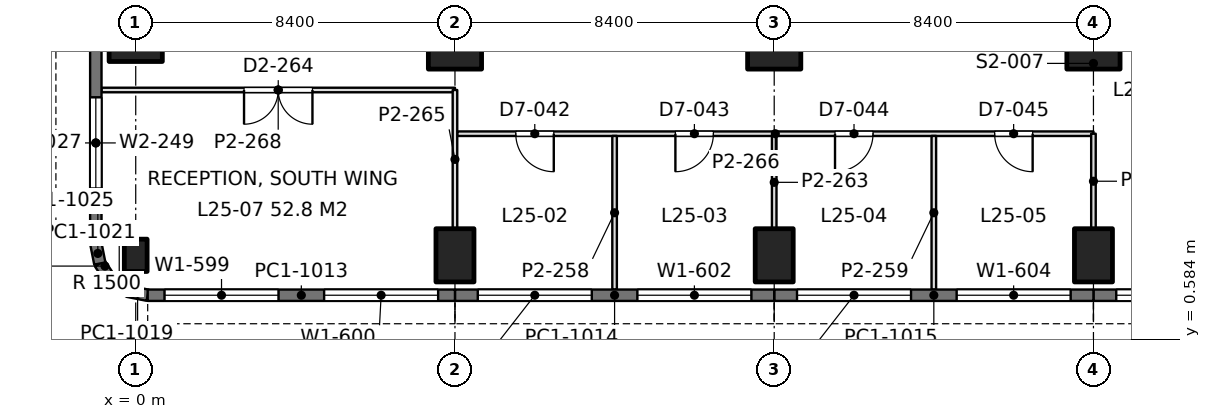
"""IFC4 building model, lengths in metres.
Left out: names, types, materials, properties, quantities, classifications, styles, units other than length and angle.
Written with IfcOpenShell. Run it as: python <this file> out.ifc"""

import sys

from ifc_helpers import new_model, si_unit, direction, frame, frame_2d, origin, origin_2d, place, context, subcontext, project, spatial, rectangle, extrude, element, fill, save


model = new_model("IFC4")
c1 = context("Model", 3, precision=1e-05, world=origin(), true_north=direction((0.0, 1.0)))
c2 = subcontext(c1, "Body", "Model", "MODEL_VIEW")
j1 = project(units=[si_unit("LENGTHUNIT", "METRE"), si_unit("PLANEANGLEUNIT", "RADIAN")], contexts=[c1])
p1 = place(None, origin())
s1 = spatial("IfcSite", under=j1, at=p1, CompositionType="ELEMENT")
p2 = place(p1, origin())
s2 = spatial("IfcBuilding", under=s1, at=p2, CompositionType="ELEMENT")
p3 = place(p2, frame((0.0, 0.0, 113.4)))
s3 = spatial("IfcBuildingStorey", under=s2, at=p3, CompositionType="ELEMENT", Elevation=113.4)
p4 = place(p3, frame((0.0, 2.8, 0.0), z_axis=(0.0, 0.0, 1.0), x_axis=(1.0, 0.0, 0.0)))
e1 = element("IfcColumn", 1, at=p4, inside=s3, PredefinedType="COLUMN", context=c2, shape_type="SweptSolid", body=[
    extrude(rectangle(XDim=0.6, YDim=0.85, at=origin_2d()), origin(), (0.0, 0.0, 1.0), 4.2),
])
for number, where, z_axis, x_axis in (
    (2, (0.0, 8.4, 0.0), (0.0, 0.0, 1.0), (0.0, 1.0, 0.0)),
    (3, (8.4, 2.8, 0.0), (0.0, 0.0, 1.0), (1.0, 0.0, 0.0)),
):
    element("IfcColumn", number, at=place(p3, frame(where, z_axis=z_axis, x_axis=x_axis)), inside=s3, PredefinedType="COLUMN", context=c2, shape_type="SweptSolid", body=[
        extrude(rectangle(XDim=1.0, YDim=1.4, at=origin_2d()), origin(), (0.0, 0.0, 1.0), 4.2),
    ])
p5 = place(p3, frame((8.4, 8.4, 0.0), z_axis=(0.0, 0.0, 1.0), x_axis=(1.0, 0.0, 0.0)))
e4 = element("IfcColumn", 4, at=p5, inside=s3, PredefinedType="COLUMN", context=c2, shape_type="SweptSolid", body=[
    extrude(rectangle(XDim=1.4, YDim=1.4, at=origin_2d()), origin(), (0.0, 0.0, 1.0), 4.2),
])
p6 = place(p3, frame((16.8, 2.8, 0.0), z_axis=(0.0, 0.0, 1.0), x_axis=(1.0, 0.0, 0.0)))
e5 = element("IfcColumn", 5, at=p6, inside=s3, PredefinedType="COLUMN", context=c2, shape_type="SweptSolid", body=[
    extrude(rectangle(XDim=1.0, YDim=1.4, at=origin_2d()), origin(), (0.0, 0.0, 1.0), 4.2),
])
p7 = place(p3, frame((16.8, 8.4, 0.0), z_axis=(0.0, 0.0, 1.0), x_axis=(1.0, 0.0, 0.0)))
e6 = element("IfcColumn", 6, at=p7, inside=s3, PredefinedType="COLUMN", context=c2, shape_type="SweptSolid", body=[
    extrude(rectangle(XDim=1.4, YDim=1.4, at=origin_2d()), origin(), (0.0, 0.0, 1.0), 4.2),
])
p8 = place(p3, frame((25.2, 2.8, 0.0), z_axis=(0.0, 0.0, 1.0), x_axis=(1.0, 0.0, 0.0)))
e7 = element("IfcColumn", 7, at=p8, inside=s3, PredefinedType="COLUMN", context=c2, shape_type="SweptSolid", body=[
    extrude(rectangle(XDim=1.0, YDim=1.4, at=origin_2d()), origin(), (0.0, 0.0, 1.0), 4.2),
])
p9 = place(p3, frame((25.2, 8.4, 0.0), z_axis=(0.0, 0.0, 1.0), x_axis=(1.0, 0.0, 0.0)))
e8 = element("IfcColumn", 8, at=p9, inside=s3, PredefinedType="COLUMN", context=c2, shape_type="SweptSolid", body=[
    extrude(rectangle(XDim=1.4, YDim=1.4, at=origin_2d()), origin(), (0.0, 0.0, 1.0), 4.2),
])
p10 = place(p3, frame((33.6, 1.75, 0.0), z_axis=(0.0, 0.0, 1.0), x_axis=(-1.0, 0.0, 0.0)))
e9 = element("IfcWall", 9, at=p10, inside=s3, PredefinedType="SOLIDWALL", context=c2, shape_type="SweptSolid", body=[
    extrude(rectangle(XDim=8.4, YDim=0.3, at=frame_2d((4.2, 0.0))), origin(), (0.0, 0.0, 1.0), 4.05),
])
p11 = place(p10, frame((0.6, 0.0, 0.9)))
e10 = element("IfcOpeningElement", 10, at=p11, cuts=e9, PredefinedType="OPENING", context=c2, shape_type="SweptSolid", body=[
    extrude(rectangle(XDim=3.0, YDim=1.9, at=frame_2d((1.5, 0.95))), frame((0.0, 0.16, 0.0), z_axis=(0.0, -1.0, 0.0), x_axis=(1.0, 0.0, 0.0)), (0.0, 0.0, 1.0), 0.32),
])
p12 = place(p10, frame((4.8, 0.0, 0.9)))
e11 = element("IfcOpeningElement", 11, at=p12, cuts=e9, PredefinedType="OPENING", context=c2, shape_type="SweptSolid", body=[
    extrude(rectangle(XDim=3.0, YDim=1.9, at=frame_2d((1.5, 0.95))), frame((0.0, 0.16, 0.0), z_axis=(0.0, -1.0, 0.0), x_axis=(1.0, 0.0, 0.0)), (0.0, 0.0, 1.0), 0.32),
])
p13 = place(p3, frame((25.2, 1.75, 0.0), z_axis=(0.0, 0.0, 1.0), x_axis=(-1.0, 0.0, 0.0)))
e12 = element("IfcWall", 12, at=p13, inside=s3, PredefinedType="SOLIDWALL", context=c2, shape_type="SweptSolid", body=[
    extrude(rectangle(XDim=8.4, YDim=0.3, at=frame_2d((4.2, 0.0))), origin(), (0.0, 0.0, 1.0), 4.05),
])
p14 = place(p13, frame((0.6, 0.0, 0.9)))
e13 = element("IfcOpeningElement", 13, at=p14, cuts=e12, PredefinedType="OPENING", context=c2, shape_type="SweptSolid", body=[
    extrude(rectangle(XDim=3.0, YDim=1.9, at=frame_2d((1.5, 0.95))), frame((0.0, 0.16, 0.0), z_axis=(0.0, -1.0, 0.0), x_axis=(1.0, 0.0, 0.0)), (0.0, 0.0, 1.0), 0.32),
])
p15 = place(p13, frame((4.8, 0.0, 0.9)))
e14 = element("IfcOpeningElement", 14, at=p15, cuts=e12, PredefinedType="OPENING", context=c2, shape_type="SweptSolid", body=[
    extrude(rectangle(XDim=3.0, YDim=1.9, at=frame_2d((1.5, 0.95))), frame((0.0, 0.16, 0.0), z_axis=(0.0, -1.0, 0.0), x_axis=(1.0, 0.0, 0.0)), (0.0, 0.0, 1.0), 0.32),
])
p16 = place(p3, frame((16.8, 1.75, 0.0), z_axis=(0.0, 0.0, 1.0), x_axis=(-1.0, 0.0, 0.0)))
e15 = element("IfcWall", 15, at=p16, inside=s3, PredefinedType="SOLIDWALL", context=c2, shape_type="SweptSolid", body=[
    extrude(rectangle(XDim=8.4, YDim=0.3, at=frame_2d((4.2, 0.0))), origin(), (0.0, 0.0, 1.0), 4.05),
])
p17 = place(p16, frame((0.6, 0.0, 0.9)))
e16 = element("IfcOpeningElement", 16, at=p17, cuts=e15, PredefinedType="OPENING", context=c2, shape_type="SweptSolid", body=[
    extrude(rectangle(XDim=3.0, YDim=1.9, at=frame_2d((1.5, 0.95))), frame((0.0, 0.16, 0.0), z_axis=(0.0, -1.0, 0.0), x_axis=(1.0, 0.0, 0.0)), (0.0, 0.0, 1.0), 0.32),
])
p18 = place(p16, frame((4.8, 0.0, 0.9)))
e17 = element("IfcOpeningElement", 17, at=p18, cuts=e15, PredefinedType="OPENING", context=c2, shape_type="SweptSolid", body=[
    extrude(rectangle(XDim=3.0, YDim=1.9, at=frame_2d((1.5, 0.95))), frame((0.0, 0.16, 0.0), z_axis=(0.0, -1.0, 0.0), x_axis=(1.0, 0.0, 0.0)), (0.0, 0.0, 1.0), 0.32),
])
p19 = place(p3, frame((8.4, 1.75, 0.0), z_axis=(0.0, 0.0, 1.0), x_axis=(-1.0, 0.0, 0.0)))
e18 = element("IfcWall", 18, at=p19, inside=s3, PredefinedType="SOLIDWALL", context=c2, shape_type="SweptSolid", body=[
    extrude(rectangle(XDim=8.085, YDim=0.3, at=frame_2d((4.042, 0.0))), origin(), (0.0, 0.0, 1.0), 4.05),
])
p20 = place(p19, frame((0.443, 0.0, 0.9)))
e19 = element("IfcOpeningElement", 19, at=p20, cuts=e18, PredefinedType="OPENING", context=c2, shape_type="SweptSolid", body=[
    extrude(rectangle(XDim=3.0, YDim=1.9, at=frame_2d((1.5, 0.95))), frame((0.0, 0.16, 0.0), z_axis=(0.0, -1.0, 0.0), x_axis=(1.0, 0.0, 0.0)), (0.0, 0.0, 1.0), 0.32),
])
p21 = place(p19, frame((4.643, 0.0, 0.9)))
e20 = element("IfcOpeningElement", 20, at=p21, cuts=e18, PredefinedType="OPENING", context=c2, shape_type="SweptSolid", body=[
    extrude(rectangle(XDim=3.0, YDim=1.9, at=frame_2d((1.5, 0.95))), frame((0.0, 0.16, 0.0), z_axis=(0.0, -1.0, 0.0), x_axis=(1.0, 0.0, 0.0)), (0.0, 0.0, 1.0), 0.32),
])
p22 = place(p3, frame((0.315, 1.75, 0.0), z_axis=(0.0, 0.0, 1.0), x_axis=(-0.980788534345, 0.195073962632, 0.0)))
e21 = element("IfcWall", 21, at=p22, inside=s3, PredefinedType="SOLIDWALL", context=c2, shape_type="SweptSolid", body=[
    extrude(rectangle(XDim=0.541, YDim=0.3, at=frame_2d((0.271, 0.0))), origin(), (0.0, 0.0, 1.0), 4.05),
])
for number, where, z_axis, x_axis in (
    (22, (-0.216, 1.855, 0.0), (0.0, 0.0, 1.0), (-0.831, 0.556, 0.0)),
    (23, (-0.653, 2.147, 0.0), (0.0, 0.0, 1.0), (-0.556, 0.831, 0.0)),
):
    element("IfcWall", number, at=place(p3, frame(where, z_axis=z_axis, x_axis=x_axis)), inside=s3, PredefinedType="SOLIDWALL", context=c2, shape_type="SweptSolid", body=[
        extrude(rectangle(XDim=0.526, YDim=0.3, at=frame_2d((0.263, 0.0))), origin(), (0.0, 0.0, 1.0), 4.05),
    ])
p23 = place(p3, frame((-0.945, 2.584, 0.0), z_axis=(0.0, 0.0, 1.0), x_axis=(-0.195073962632, 0.980788534345, 0.0)))
e24 = element("IfcWall", 24, at=p23, inside=s3, PredefinedType="SOLIDWALL", context=c2, shape_type="SweptSolid", body=[
    extrude(rectangle(XDim=0.541, YDim=0.3, at=frame_2d((0.271, 0.0))), origin(), (0.0, 0.0, 1.0), 4.05),
])
p24 = place(p3, frame((-1.05, 3.115, 0.0), z_axis=(0.0, 0.0, 1.0), x_axis=(0.0, 1.0, 0.0)))
e25 = element("IfcWall", 25, at=p24, inside=s3, PredefinedType="SOLIDWALL", context=c2, shape_type="SweptSolid", body=[
    extrude(rectangle(XDim=5.285, YDim=0.3, at=frame_2d((2.643, 0.0))), origin(), (0.0, 0.0, 1.0), 4.05),
])
p25 = place(p24, frame((1.443, 0.0, 0.9)))
e26 = element("IfcOpeningElement", 26, at=p25, cuts=e25, PredefinedType="OPENING", context=c2, shape_type="SweptSolid", body=[
    extrude(rectangle(XDim=2.4, YDim=1.9, at=frame_2d((1.2, 0.95))), frame((0.0, 0.16, 0.0), z_axis=(0.0, -1.0, 0.0), x_axis=(1.0, 0.0, 0.0)), (0.0, 0.0, 1.0), 0.32),
])
p26 = place(p3, frame((-0.902, 7.15, 0.0), z_axis=(0.0, 0.0, 1.0), x_axis=(1.0, 0.0, 0.0)))
e27 = element("IfcWall", 27, at=p26, inside=s3, PredefinedType="PARTITIONING", context=c2, shape_type="SweptSolid", body=[
    extrude(rectangle(XDim=9.302, YDim=0.12, at=frame_2d((4.651, 0.0))), origin(), (0.0, 0.0, 1.0), 3.55),
])
p27 = place(p26, frame((3.752, 0.0, 0.0)))
e28 = element("IfcOpeningElement", 28, at=p27, cuts=e27, PredefinedType="OPENING", context=c2, shape_type="SweptSolid", body=[
    extrude(rectangle(XDim=1.8, YDim=2.2, at=frame_2d((0.9, 1.1))), frame((0.0, 0.07, 0.0), z_axis=(0.0, -1.0, 0.0), x_axis=(1.0, 0.0, 0.0)), (0.0, 0.0, 1.0), 0.14),
])
p28 = place(p3, frame((8.458, 6.0, 0.0), z_axis=(0.0, 0.0, 1.0), x_axis=(1.0, 0.0, 0.0)))
e29 = element("IfcWall", 29, at=p28, inside=s3, PredefinedType="PARTITIONING", context=c2, shape_type="SweptSolid", body=[
    extrude(rectangle(XDim=16.742, YDim=0.12, at=frame_2d((8.371, 0.0))), origin(), (0.0, 0.0, 1.0), 3.55),
])
p29 = place(p28, frame((1.542, 0.0, 0.0)))
e30 = element("IfcOpeningElement", 30, at=p29, cuts=e29, PredefinedType="OPENING", context=c2, shape_type="SweptSolid", body=[
    extrude(rectangle(XDim=1.0, YDim=2.4, at=frame_2d((0.5, 1.2))), frame((0.0, 0.07, 0.0), z_axis=(0.0, -1.0, 0.0), x_axis=(1.0, 0.0, 0.0)), (0.0, 0.0, 1.0), 0.14),
])
p30 = place(p28, frame((5.742, 0.0, 0.0)))
e31 = element("IfcOpeningElement", 31, at=p30, cuts=e29, PredefinedType="OPENING", context=c2, shape_type="SweptSolid", body=[
    extrude(rectangle(XDim=1.0, YDim=2.4, at=frame_2d((0.5, 1.2))), frame((0.0, 0.07, 0.0), z_axis=(0.0, -1.0, 0.0), x_axis=(1.0, 0.0, 0.0)), (0.0, 0.0, 1.0), 0.14),
])
p31 = place(p28, frame((9.942, 0.0, 0.0)))
e32 = element("IfcOpeningElement", 32, at=p31, cuts=e29, PredefinedType="OPENING", context=c2, shape_type="SweptSolid", body=[
    extrude(rectangle(XDim=1.0, YDim=2.4, at=frame_2d((0.5, 1.2))), frame((0.0, 0.07, 0.0), z_axis=(0.0, -1.0, 0.0), x_axis=(1.0, 0.0, 0.0)), (0.0, 0.0, 1.0), 0.14),
])
p32 = place(p28, frame((14.142, 0.0, 0.0)))
e33 = element("IfcOpeningElement", 33, at=p32, cuts=e29, PredefinedType="OPENING", context=c2, shape_type="SweptSolid", body=[
    extrude(rectangle(XDim=1.0, YDim=2.4, at=frame_2d((0.5, 1.2))), frame((0.0, 0.07, 0.0), z_axis=(0.0, -1.0, 0.0), x_axis=(1.0, 0.0, 0.0)), (0.0, 0.0, 1.0), 0.14),
])
p33 = place(p3, frame((8.4, 3.499, 0.0), z_axis=(0.0, 0.0, 1.0), x_axis=(0.0, 1.0, 0.0)))
e34 = element("IfcWall", 34, at=p33, inside=s3, PredefinedType="PARTITIONING", context=c2, shape_type="SweptSolid", body=[
    extrude(rectangle(XDim=3.651, YDim=0.12, at=frame_2d((1.825, 0.0))), origin(), (0.0, 0.0, 1.0), 3.55),
])
p34 = place(p3, frame((12.6, 1.898, 0.0), z_axis=(0.0, 0.0, 1.0), x_axis=(0.0, 1.0, 0.0)))
e35 = element("IfcWall", 35, at=p34, inside=s3, PredefinedType="PARTITIONING", context=c2, shape_type="SweptSolid", body=[
    extrude(rectangle(XDim=4.044, YDim=0.12, at=frame_2d((2.022, 0.0))), origin(), (0.0, 0.0, 1.0), 3.56),
])
p35 = place(p3, frame((16.8, 3.499, 0.0), z_axis=(0.0, 0.0, 1.0), x_axis=(0.0, 1.0, 0.0)))
e36 = element("IfcWall", 36, at=p35, inside=s3, PredefinedType="PARTITIONING", context=c2, shape_type="SweptSolid", body=[
    extrude(rectangle(XDim=2.443, YDim=0.12, at=frame_2d((1.221, 0.0))), origin(), (0.0, 0.0, 1.0), 3.55),
])
p36 = place(p3, frame((21.0, 1.898, 0.0), z_axis=(0.0, 0.0, 1.0), x_axis=(0.0, 1.0, 0.0)))
e37 = element("IfcWall", 37, at=p36, inside=s3, PredefinedType="PARTITIONING", context=c2, shape_type="SweptSolid", body=[
    extrude(rectangle(XDim=4.044, YDim=0.12, at=frame_2d((2.022, 0.0))), origin(), (0.0, 0.0, 1.0), 3.56),
])
p37 = place(p3, frame((25.2, 3.499, 0.0), z_axis=(0.0, 0.0, 1.0), x_axis=(0.0, 1.0, 0.0)))
e38 = element("IfcWall", 38, at=p37, inside=s3, PredefinedType="PARTITIONING", context=c2, shape_type="SweptSolid", body=[
    extrude(rectangle(XDim=2.501, YDim=0.12, at=frame_2d((1.25, 0.0))), origin(), (0.0, 0.0, 1.0), 3.55),
])
p38 = place(p12, origin())
e39 = element("IfcWindow", 39, at=p38, inside=s3, PartitioningType="SINGLE_PANEL", PredefinedType="WINDOW", context=c2, shape_type="SweptSolid", body=[
    extrude(rectangle(XDim=3.0, YDim=1.9, at=frame_2d((1.5, 0.95))), frame((0.0, 0.03, 0.0), z_axis=(0.0, -1.0, 0.0), x_axis=(1.0, 0.0, 0.0)), (0.0, 0.0, 1.0), 0.06),
])
fill(e11, e39)
p39 = place(p14, origin())
e40 = element("IfcWindow", 40, at=p39, inside=s3, PartitioningType="SINGLE_PANEL", PredefinedType="WINDOW", context=c2, shape_type="SweptSolid", body=[
    extrude(rectangle(XDim=3.0, YDim=1.9, at=frame_2d((1.5, 0.95))), frame((0.0, 0.03, 0.0), z_axis=(0.0, -1.0, 0.0), x_axis=(1.0, 0.0, 0.0)), (0.0, 0.0, 1.0), 0.06),
])
fill(e13, e40)
p40 = place(p15, origin())
e41 = element("IfcWindow", 41, at=p40, inside=s3, PartitioningType="SINGLE_PANEL", PredefinedType="WINDOW", context=c2, shape_type="SweptSolid", body=[
    extrude(rectangle(XDim=3.0, YDim=1.9, at=frame_2d((1.5, 0.95))), frame((0.0, 0.03, 0.0), z_axis=(0.0, -1.0, 0.0), x_axis=(1.0, 0.0, 0.0)), (0.0, 0.0, 1.0), 0.06),
])
fill(e14, e41)
p41 = place(p17, origin())
e42 = element("IfcWindow", 42, at=p41, inside=s3, PartitioningType="SINGLE_PANEL", PredefinedType="WINDOW", context=c2, shape_type="SweptSolid", body=[
    extrude(rectangle(XDim=3.0, YDim=1.9, at=frame_2d((1.5, 0.95))), frame((0.0, 0.03, 0.0), z_axis=(0.0, -1.0, 0.0), x_axis=(1.0, 0.0, 0.0)), (0.0, 0.0, 1.0), 0.06),
])
fill(e16, e42)
p42 = place(p18, origin())
e43 = element("IfcWindow", 43, at=p42, inside=s3, PartitioningType="SINGLE_PANEL", PredefinedType="WINDOW", context=c2, shape_type="SweptSolid", body=[
    extrude(rectangle(XDim=3.0, YDim=1.9, at=frame_2d((1.5, 0.95))), frame((0.0, 0.03, 0.0), z_axis=(0.0, -1.0, 0.0), x_axis=(1.0, 0.0, 0.0)), (0.0, 0.0, 1.0), 0.06),
])
fill(e17, e43)
p43 = place(p20, origin())
e44 = element("IfcWindow", 44, at=p43, inside=s3, PartitioningType="SINGLE_PANEL", PredefinedType="WINDOW", context=c2, shape_type="SweptSolid", body=[
    extrude(rectangle(XDim=3.0, YDim=1.9, at=frame_2d((1.5, 0.95))), frame((0.0, 0.03, 0.0), z_axis=(0.0, -1.0, 0.0), x_axis=(1.0, 0.0, 0.0)), (0.0, 0.0, 1.0), 0.06),
])
fill(e19, e44)
p44 = place(p21, origin())
e45 = element("IfcWindow", 45, at=p44, inside=s3, PartitioningType="SINGLE_PANEL", PredefinedType="WINDOW", context=c2, shape_type="SweptSolid", body=[
    extrude(rectangle(XDim=3.0, YDim=1.9, at=frame_2d((1.5, 0.95))), frame((0.0, 0.03, 0.0), z_axis=(0.0, -1.0, 0.0), x_axis=(1.0, 0.0, 0.0)), (0.0, 0.0, 1.0), 0.06),
])
fill(e20, e45)
p45 = place(p25, origin())
e46 = element("IfcWindow", 46, at=p45, inside=s3, PartitioningType="SINGLE_PANEL", PredefinedType="WINDOW", context=c2, shape_type="SweptSolid", body=[
    extrude(rectangle(XDim=2.4, YDim=1.9, at=frame_2d((1.2, 0.95))), frame((0.0, 0.03, 0.0), z_axis=(0.0, -1.0, 0.0), x_axis=(1.0, 0.0, 0.0)), (0.0, 0.0, 1.0), 0.06),
])
fill(e26, e46)
p46 = place(p27, frame((1.8, 0.0, 0.0), z_axis=(0.0, 0.0, 1.0), x_axis=(-1.0, 0.0, 0.0)))
e47 = element("IfcDoor", 47, at=p46, inside=s3, OperationType="DOUBLE_DOOR_SINGLE_SWING", PredefinedType="DOOR", context=c2, shape_type="SweptSolid", body=[
    extrude(rectangle(XDim=1.8, YDim=2.2, at=frame_2d((0.9, 1.1))), frame((0.0, 0.025, 0.0), z_axis=(0.0, -1.0, 0.0), x_axis=(1.0, 0.0, 0.0)), (0.0, 0.0, 1.0), 0.05),
])
fill(e28, e47)
p47 = place(p29, frame((1.0, 0.0, 0.0), z_axis=(0.0, 0.0, 1.0), x_axis=(-1.0, 0.0, 0.0)))
e48 = element("IfcDoor", 48, at=p47, inside=s3, OperationType="SINGLE_SWING_LEFT", PredefinedType="DOOR", context=c2, shape_type="SweptSolid", body=[
    extrude(rectangle(XDim=1.0, YDim=2.4, at=frame_2d((0.5, 1.2))), frame((0.0, 0.025, 0.0), z_axis=(0.0, -1.0, 0.0), x_axis=(1.0, 0.0, 0.0)), (0.0, 0.0, 1.0), 0.05),
])
fill(e30, e48)
p48 = place(p30, frame((1.0, 0.0, 0.0), z_axis=(0.0, 0.0, 1.0), x_axis=(-1.0, 0.0, 0.0)))
e49 = element("IfcDoor", 49, at=p48, inside=s3, OperationType="SINGLE_SWING_RIGHT", PredefinedType="DOOR", context=c2, shape_type="SweptSolid", body=[
    extrude(rectangle(XDim=1.0, YDim=2.4, at=frame_2d((0.5, 1.2))), frame((0.0, 0.025, 0.0), z_axis=(0.0, -1.0, 0.0), x_axis=(1.0, 0.0, 0.0)), (0.0, 0.0, 1.0), 0.05),
])
fill(e31, e49)
p49 = place(p31, frame((1.0, 0.0, 0.0), z_axis=(0.0, 0.0, 1.0), x_axis=(-1.0, 0.0, 0.0)))
e50 = element("IfcDoor", 50, at=p49, inside=s3, OperationType="SINGLE_SWING_RIGHT", PredefinedType="DOOR", context=c2, shape_type="SweptSolid", body=[
    extrude(rectangle(XDim=1.0, YDim=2.4, at=frame_2d((0.5, 1.2))), frame((0.0, 0.025, 0.0), z_axis=(0.0, -1.0, 0.0), x_axis=(1.0, 0.0, 0.0)), (0.0, 0.0, 1.0), 0.05),
])
fill(e32, e50)
p50 = place(p32, frame((1.0, 0.0, 0.0), z_axis=(0.0, 0.0, 1.0), x_axis=(-1.0, 0.0, 0.0)))
e51 = element("IfcDoor", 51, at=p50, inside=s3, OperationType="SINGLE_SWING_LEFT", PredefinedType="DOOR", context=c2, shape_type="SweptSolid", body=[
    extrude(rectangle(XDim=1.0, YDim=2.4, at=frame_2d((0.5, 1.2))), frame((0.0, 0.025, 0.0), z_axis=(0.0, -1.0, 0.0), x_axis=(1.0, 0.0, 0.0)), (0.0, 0.0, 1.0), 0.05),
])
fill(e33, e51)
save(model, sys.argv[1])
